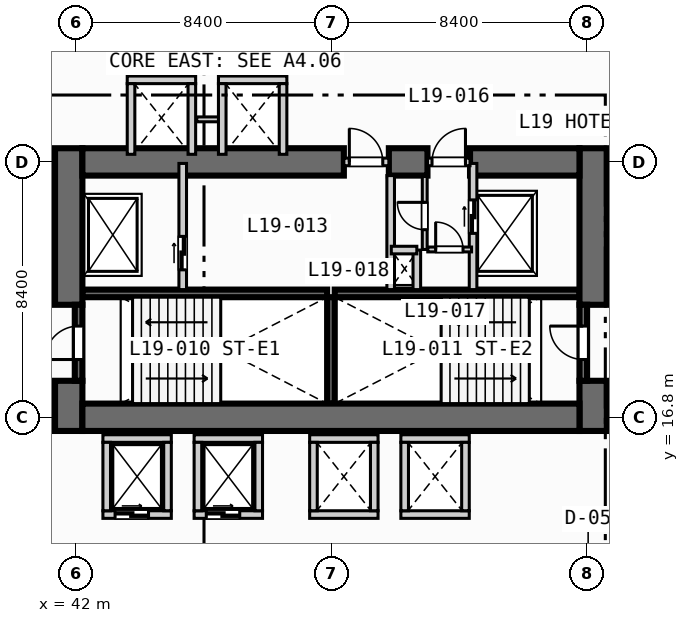
"""IFC4 building model, lengths in metres.
Left out: names, types, materials, properties, quantities, classifications, styles, units other than length and angle.
Written with IfcOpenShell. Run it as: python <this file> out.ifc"""

import sys

from ifc_helpers import new_model, si_unit, direction, frame, frame_2d, origin, place, context, subcontext, project, spatial, rectangle, extrude, element, fill, save


model = new_model("IFC4")
c1 = context("Model", 3, precision=1e-05, world=origin(), true_north=direction((0.0, 1.0)))
c2 = subcontext(c1, "Body", "Model", "MODEL_VIEW")
j1 = project(units=[si_unit("LENGTHUNIT", "METRE"), si_unit("PLANEANGLEUNIT", "RADIAN")], contexts=[c1])
p1 = place(None, origin())
s1 = spatial("IfcSite", under=j1, at=p1, CompositionType="ELEMENT")
p2 = place(p1, origin())
s2 = spatial("IfcBuilding", under=s1, at=p2, CompositionType="ELEMENT")
p3 = place(p2, frame((0.0, 0.0, 81.4)))
s3 = spatial("IfcBuildingStorey", under=s2, at=p3, CompositionType="ELEMENT", Elevation=81.4)
for number, where, z_axis, x_axis in (
    (1, (42.2, 20.875, 0.0), (0.0, 0.0, 1.0), (1.0, 0.0, 0.0)),
    (2, (50.5, 20.875, 0.0), (0.0, 0.0, 1.0), (1.0, 0.0, 0.0)),
):
    element("IfcWall", number, at=place(p3, frame(where, z_axis=z_axis, x_axis=x_axis)), inside=s3, PredefinedType="SOLIDWALL", context=c2, shape_type="SweptSolid", body=[
        extrude(rectangle(XDim=8.05, YDim=0.25, at=frame_2d((4.025, 0.0))), origin(), (0.0, 0.0, 1.0), 3.55),
    ])
p4 = place(p3, frame((50.375, 17.25, 0.0), z_axis=(0.0, 0.0, 1.0), x_axis=(0.0, 1.0, 0.0)))
e3 = element("IfcWall", 3, at=p4, inside=s3, PredefinedType="SOLIDWALL", context=c2, shape_type="SweptSolid", body=[
    extrude(rectangle(XDim=3.5, YDim=0.25, at=frame_2d((1.75, 0.0))), origin(), (0.0, 0.0, 1.0), 3.55),
])
p5 = place(p3, frame((41.75, 16.35, 0.0), z_axis=(0.0, 0.0, 1.0), x_axis=(0.0, 1.0, 0.0)))
e4 = element("IfcWall", 4, at=p5, inside=s3, PredefinedType="SHEAR", context=c2, shape_type="SweptSolid", body=[
    extrude(rectangle(XDim=1.65, YDim=0.9, at=frame_2d((0.825, 0.0))), origin(), (0.0, 0.0, 1.0), 3.55),
])
p6 = place(p3, frame((41.75, 20.5, 0.0), z_axis=(0.0, 0.0, 1.0), x_axis=(0.0, 1.0, 0.0)))
e5 = element("IfcWall", 5, at=p6, inside=s3, PredefinedType="SHEAR", context=c2, shape_type="SweptSolid", body=[
    extrude(rectangle(XDim=5.15, YDim=0.9, at=frame_2d((2.575, 0.0))), origin(), (0.0, 0.0, 1.0), 3.55),
])
p7 = place(p3, frame((59.0, 16.35, 0.0), z_axis=(0.0, 0.0, 1.0), x_axis=(0.0, 1.0, 0.0)))
e6 = element("IfcWall", 6, at=p7, inside=s3, PredefinedType="SHEAR", context=c2, shape_type="SweptSolid", body=[
    extrude(rectangle(XDim=1.65, YDim=0.9, at=frame_2d((0.825, 0.0))), origin(), (0.0, 0.0, 1.0), 3.55),
])
p8 = place(p3, frame((59.0, 20.5, 0.0), z_axis=(0.0, 0.0, 1.0), x_axis=(0.0, 1.0, 0.0)))
e7 = element("IfcWall", 7, at=p8, inside=s3, PredefinedType="SHEAR", context=c2, shape_type="SweptSolid", body=[
    extrude(rectangle(XDim=5.15, YDim=0.9, at=frame_2d((2.575, 0.0))), origin(), (0.0, 0.0, 1.0), 3.55),
])
p9 = place(p3, frame((42.2, 16.8, 0.0), z_axis=(0.0, 0.0, 1.0), x_axis=(1.0, 0.0, 0.0)))
e8 = element("IfcWall", 8, at=p9, inside=s3, PredefinedType="SHEAR", context=c2, shape_type="SweptSolid", body=[
    extrude(rectangle(XDim=16.35, YDim=0.9, at=frame_2d((8.175, 0.0))), origin(), (0.0, 0.0, 1.0), 3.55),
])
p10 = place(p3, frame((42.2, 25.2, 0.0), z_axis=(0.0, 0.0, 1.0), x_axis=(1.0, 0.0, 0.0)))
e9 = element("IfcWall", 9, at=p10, inside=s3, PredefinedType="SHEAR", context=c2, shape_type="SweptSolid", body=[
    extrude(rectangle(XDim=8.6, YDim=0.9, at=frame_2d((4.3, 0.0))), origin(), (0.0, 0.0, 1.0), 3.55),
])
p11 = place(p3, frame((52.28, 25.2, 0.0), z_axis=(0.0, 0.0, 1.0), x_axis=(1.0, 0.0, 0.0)))
e10 = element("IfcWall", 10, at=p11, inside=s3, PredefinedType="SHEAR", context=c2, shape_type="SweptSolid", body=[
    extrude(rectangle(XDim=1.27, YDim=0.9, at=frame_2d((0.635, 0.0))), origin(), (0.0, 0.0, 1.0), 3.55),
])
p12 = place(p3, frame((54.95, 25.2, 0.0), z_axis=(0.0, 0.0, 1.0), x_axis=(1.0, 0.0, 0.0)))
e11 = element("IfcWall", 11, at=p12, inside=s3, PredefinedType="SHEAR", context=c2, shape_type="SweptSolid", body=[
    extrude(rectangle(XDim=3.6, YDim=0.9, at=frame_2d((1.8, 0.0))), origin(), (0.0, 0.0, 1.0), 3.55),
])
p13 = place(p3, frame((42.075, 18.0, 0.0), z_axis=(0.0, 0.0, 1.0), x_axis=(0.0, 1.0, 0.0)))
e12 = element("IfcWall", 12, at=p13, inside=s3, PredefinedType="SOLIDWALL", context=c2, shape_type="SweptSolid", body=[
    extrude(rectangle(XDim=2.5, YDim=0.25, at=frame_2d((1.25, 0.0))), origin(), (0.0, 0.0, 1.0), 3.55),
])
p14 = place(p13, frame((0.7, 0.0, 0.0)))
e13 = element("IfcOpeningElement", 13, at=p14, cuts=e12, PredefinedType="OPENING", context=c2, shape_type="SweptSolid", body=[
    extrude(rectangle(XDim=1.1, YDim=2.15, at=frame_2d((0.55, 1.075))), frame((0.0, 0.135, 0.0), z_axis=(0.0, -1.0, 0.0), x_axis=(1.0, 0.0, 0.0)), (0.0, 0.0, 1.0), 0.27),
])
p15 = place(p3, frame((58.675, 18.0, 0.0), z_axis=(0.0, 0.0, 1.0), x_axis=(0.0, 1.0, 0.0)))
e14 = element("IfcWall", 14, at=p15, inside=s3, PredefinedType="SOLIDWALL", context=c2, shape_type="SweptSolid", body=[
    extrude(rectangle(XDim=2.5, YDim=0.25, at=frame_2d((1.25, 0.0))), origin(), (0.0, 0.0, 1.0), 3.55),
])
p16 = place(p15, frame((0.7, 0.0, 0.0)))
e15 = element("IfcOpeningElement", 15, at=p16, cuts=e14, PredefinedType="OPENING", context=c2, shape_type="SweptSolid", body=[
    extrude(rectangle(XDim=1.1, YDim=2.15, at=frame_2d((0.55, 1.075))), frame((0.0, 0.135, 0.0), z_axis=(0.0, -1.0, 0.0), x_axis=(1.0, 0.0, 0.0)), (0.0, 0.0, 1.0), 0.27),
])
p17 = place(p3, frame((45.5, 21.0, 0.0), z_axis=(0.0, 0.0, 1.0), x_axis=(0.0, 1.0, 0.0)))
e16 = element("IfcWall", 16, at=p17, inside=s3, PredefinedType="SOLIDWALL", context=c2, shape_type="SweptSolid", body=[
    extrude(rectangle(XDim=4.15, YDim=0.25, at=frame_2d((2.075, 0.0))), origin(), (0.0, 0.0, 1.0), 3.55),
])
p18 = place(p17, frame((0.65, 0.0, 0.0)))
e17 = element("IfcOpeningElement", 17, at=p18, cuts=e16, PredefinedType="OPENING", context=c2, shape_type="SweptSolid", body=[
    extrude(rectangle(XDim=1.1, YDim=2.15, at=frame_2d((0.55, 1.075))), frame((0.0, 0.135, 0.0), z_axis=(0.0, -1.0, 0.0), x_axis=(1.0, 0.0, 0.0)), (0.0, 0.0, 1.0), 0.27),
])
p19 = place(p3, frame((50.8, 25.2, 0.0), z_axis=(0.0, 0.0, 1.0), x_axis=(1.0, 0.0, 0.0)))
e18 = element("IfcWall", 18, at=p19, inside=s3, PredefinedType="SOLIDWALL", context=c2, shape_type="SweptSolid", body=[
    extrude(rectangle(XDim=1.48, YDim=0.25, at=frame_2d((0.74, 0.0))), origin(), (0.0, 0.0, 1.0), 3.55),
])
p20 = place(p19, frame((0.18, 0.0, 0.0)))
e19 = element("IfcOpeningElement", 19, at=p20, cuts=e18, PredefinedType="OPENING", context=c2, shape_type="SweptSolid", body=[
    extrude(rectangle(XDim=1.1, YDim=2.15, at=frame_2d((0.55, 1.075))), frame((0.0, 0.135, 0.0), z_axis=(0.0, -1.0, 0.0), x_axis=(1.0, 0.0, 0.0)), (0.0, 0.0, 1.0), 0.27),
])
p21 = place(p3, frame((52.34, 21.0, 0.0), z_axis=(0.0, 0.0, 1.0), x_axis=(0.0, 1.0, 0.0)))
e20 = element("IfcWall", 20, at=p21, inside=s3, PredefinedType="SOLIDWALL", context=c2, shape_type="SweptSolid", body=[
    extrude(rectangle(XDim=3.75, YDim=0.25, at=frame_2d((1.875, 0.0))), origin(), (0.0, 0.0, 1.0), 3.55),
])
p22 = place(p3, frame((55.05, 21.0, 0.0), z_axis=(0.0, 0.0, 1.0), x_axis=(0.0, 1.0, 0.0)))
e21 = element("IfcWall", 21, at=p22, inside=s3, PredefinedType="SOLIDWALL", context=c2, shape_type="SweptSolid", body=[
    extrude(rectangle(XDim=4.15, YDim=0.25, at=frame_2d((2.075, 0.0))), origin(), (0.0, 0.0, 1.0), 3.55),
])
p23 = place(p22, frame((1.85, 0.0, 0.0)))
e22 = element("IfcOpeningElement", 22, at=p23, cuts=e21, PredefinedType="OPENING", context=c2, shape_type="SweptSolid", body=[
    extrude(rectangle(XDim=1.1, YDim=2.15, at=frame_2d((0.55, 1.075))), frame((0.0, 0.135, 0.0), z_axis=(0.0, -1.0, 0.0), x_axis=(1.0, 0.0, 0.0)), (0.0, 0.0, 1.0), 0.27),
])
p24 = place(p3, frame((53.55, 25.2, 0.0), z_axis=(0.0, 0.0, 1.0), x_axis=(1.0, 0.0, 0.0)))
e23 = element("IfcWall", 23, at=p24, inside=s3, PredefinedType="SOLIDWALL", context=c2, shape_type="SweptSolid", body=[
    extrude(rectangle(XDim=1.4, YDim=0.25, at=frame_2d((0.7, 0.0))), origin(), (0.0, 0.0, 1.0), 3.55),
])
p25 = place(p24, frame((0.15, 0.0, 0.0)))
e24 = element("IfcOpeningElement", 24, at=p25, cuts=e23, PredefinedType="OPENING", context=c2, shape_type="SweptSolid", body=[
    extrude(rectangle(XDim=1.1, YDim=2.15, at=frame_2d((0.55, 1.075))), frame((0.0, 0.135, 0.0), z_axis=(0.0, -1.0, 0.0), x_axis=(1.0, 0.0, 0.0)), (0.0, 0.0, 1.0), 0.27),
])
p26 = place(p3, frame((53.2, 21.0, 0.0), z_axis=(0.0, 0.0, 1.0), x_axis=(0.0, 1.0, 0.0)))
e25 = element("IfcWall", 25, at=p26, inside=s3, PredefinedType="SOLIDWALL", context=c2, shape_type="SweptSolid", body=[
    extrude(rectangle(XDim=1.3, YDim=0.25, at=frame_2d((0.65, 0.0))), origin(), (0.0, 0.0, 1.0), 3.55),
])
p27 = place(p3, frame((52.36, 22.3, 0.0), z_axis=(0.0, 0.0, 1.0), x_axis=(1.0, 0.0, 0.0)))
e26 = element("IfcWall", 26, at=p27, inside=s3, PredefinedType="SOLIDWALL", context=c2, shape_type="SweptSolid", body=[
    extrude(rectangle(XDim=0.84, YDim=0.25, at=frame_2d((0.42, 0.0))), origin(), (0.0, 0.0, 1.0), 3.55),
])
p28 = place(p3, frame((53.56, 22.32, 0.0), z_axis=(0.0, 0.0, 1.0), x_axis=(1.0, 0.0, 0.0)))
e27 = element("IfcWall", 27, at=p28, inside=s3, PredefinedType="PARTITIONING", context=c2, shape_type="SweptSolid", body=[
    extrude(rectangle(XDim=1.44, YDim=0.16, at=frame_2d((0.72, 0.0))), origin(), (0.0, 0.0, 1.0), 3.55),
])
p29 = place(p28, frame((0.26, 0.0, 0.0)))
e28 = element("IfcOpeningElement", 28, at=p29, cuts=e27, PredefinedType="OPENING", context=c2, shape_type="SweptSolid", body=[
    extrude(rectangle(XDim=0.9, YDim=2.1, at=frame_2d((0.45, 1.05))), frame((0.0, 0.09, 0.0), z_axis=(0.0, -1.0, 0.0), x_axis=(1.0, 0.0, 0.0)), (0.0, 0.0, 1.0), 0.18),
])
p30 = place(p3, frame((53.46, 22.32, 0.0), z_axis=(0.0, 0.0, 1.0), x_axis=(0.0, 1.0, 0.0)))
e29 = element("IfcWall", 29, at=p30, inside=s3, PredefinedType="PARTITIONING", context=c2, shape_type="SweptSolid", body=[
    extrude(rectangle(XDim=2.4, YDim=0.16, at=frame_2d((1.2, 0.0))), origin(), (0.0, 0.0, 1.0), 3.55),
])
p31 = place(p30, frame((0.65, 0.0, 0.0)))
e30 = element("IfcOpeningElement", 30, at=p31, cuts=e29, PredefinedType="OPENING", context=c2, shape_type="SweptSolid", body=[
    extrude(rectangle(XDim=0.9, YDim=2.1, at=frame_2d((0.45, 1.05))), frame((0.0, 0.09, 0.0), z_axis=(0.0, -1.0, 0.0), x_axis=(1.0, 0.0, 0.0)), (0.0, 0.0, 1.0), 0.18),
])
p32 = place(p3, frame((42.875, 13.6, 0.0), z_axis=(0.0, 0.0, 1.0), x_axis=(1.0, 0.0, 0.0)))
e31 = element("IfcWall", 31, at=p32, inside=s3, PredefinedType="SOLIDWALL", context=c2, shape_type="SweptSolid", body=[
    extrude(rectangle(XDim=2.25, YDim=0.25, at=frame_2d((1.125, 0.0))), origin(), (0.0, 0.0, 1.0), 3.55),
])
p33 = place(p32, frame((0.4, 0.0, 0.0)))
e32 = element("IfcOpeningElement", 32, at=p33, cuts=e31, PredefinedType="OPENING", context=c2, shape_type="SweptSolid", body=[
    extrude(rectangle(XDim=1.1, YDim=2.15, at=frame_2d((0.55, 1.075))), frame((0.0, 0.135, 0.0), z_axis=(0.0, -1.0, 0.0), x_axis=(1.0, 0.0, 0.0)), (0.0, 0.0, 1.0), 0.27),
])
for number, where, z_axis, x_axis in (
    (33, (42.875, 16.1, 0.0), (0.0, 0.0, 1.0), (1.0, 0.0, 0.0)),
    (34, (43.0, 13.725, 0.0), (0.0, 0.0, 1.0), (0.0, 1.0, 0.0)),
    (35, (45.0, 13.725, 0.0), (0.0, 0.0, 1.0), (0.0, 1.0, 0.0)),
):
    element("IfcWall", number, at=place(p3, frame(where, z_axis=z_axis, x_axis=x_axis)), inside=s3, PredefinedType="SOLIDWALL", context=c2, shape_type="SweptSolid", body=[
        extrude(rectangle(XDim=2.25, YDim=0.25, at=frame_2d((1.125, 0.0))), origin(), (0.0, 0.0, 1.0), 3.55),
    ])
p34 = place(p3, frame((45.875, 13.6, 0.0), z_axis=(0.0, 0.0, 1.0), x_axis=(1.0, 0.0, 0.0)))
e36 = element("IfcWall", 36, at=p34, inside=s3, PredefinedType="SOLIDWALL", context=c2, shape_type="SweptSolid", body=[
    extrude(rectangle(XDim=2.25, YDim=0.25, at=frame_2d((1.125, 0.0))), origin(), (0.0, 0.0, 1.0), 3.55),
])
p35 = place(p34, frame((0.4, 0.0, 0.0)))
e37 = element("IfcOpeningElement", 37, at=p35, cuts=e36, PredefinedType="OPENING", context=c2, shape_type="SweptSolid", body=[
    extrude(rectangle(XDim=1.1, YDim=2.15, at=frame_2d((0.55, 1.075))), frame((0.0, 0.135, 0.0), z_axis=(0.0, -1.0, 0.0), x_axis=(1.0, 0.0, 0.0)), (0.0, 0.0, 1.0), 0.27),
])
for number, where, z_axis, x_axis in (
    (38, (45.875, 16.1, 0.0), (0.0, 0.0, 1.0), (1.0, 0.0, 0.0)),
    (39, (46.0, 13.725, 0.0), (0.0, 0.0, 1.0), (0.0, 1.0, 0.0)),
    (40, (48.0, 13.725, 0.0), (0.0, 0.0, 1.0), (0.0, 1.0, 0.0)),
    (41, (49.675, 13.6, 0.0), (0.0, 0.0, 1.0), (1.0, 0.0, 0.0)),
    (42, (49.675, 16.1, 0.0), (0.0, 0.0, 1.0), (1.0, 0.0, 0.0)),
    (43, (49.8, 13.725, 0.0), (0.0, 0.0, 1.0), (0.0, 1.0, 0.0)),
    (44, (51.8, 13.725, 0.0), (0.0, 0.0, 1.0), (0.0, 1.0, 0.0)),
    (45, (52.675, 13.6, 0.0), (0.0, 0.0, 1.0), (1.0, 0.0, 0.0)),
    (46, (52.675, 16.1, 0.0), (0.0, 0.0, 1.0), (1.0, 0.0, 0.0)),
    (47, (52.8, 13.725, 0.0), (0.0, 0.0, 1.0), (0.0, 1.0, 0.0)),
    (48, (54.8, 13.725, 0.0), (0.0, 0.0, 1.0), (0.0, 1.0, 0.0)),
    (49, (43.675, 27.9, 0.0), (0.0, 0.0, 1.0), (1.0, 0.0, 0.0)),
):
    element("IfcWall", number, at=place(p3, frame(where, z_axis=z_axis, x_axis=x_axis)), inside=s3, PredefinedType="SOLIDWALL", context=c2, shape_type="SweptSolid", body=[
        extrude(rectangle(XDim=2.25, YDim=0.25, at=frame_2d((1.125, 0.0))), origin(), (0.0, 0.0, 1.0), 3.55),
    ])
for number, where, z_axis, x_axis in (
    (50, (43.8, 25.45, 0.0), (0.0, 0.0, 1.0), (0.0, 1.0, 0.0)),
    (51, (45.8, 25.45, 0.0), (0.0, 0.0, 1.0), (0.0, 1.0, 0.0)),
):
    element("IfcWall", number, at=place(p3, frame(where, z_axis=z_axis, x_axis=x_axis)), inside=s3, PredefinedType="SOLIDWALL", context=c2, shape_type="SweptSolid", body=[
        extrude(rectangle(XDim=2.325, YDim=0.25, at=frame_2d((1.163, 0.0))), origin(), (0.0, 0.0, 1.0), 3.55),
    ])
p36 = place(p3, frame((45.96, 26.6, 0.0), z_axis=(0.0, 0.0, 1.0), x_axis=(1.0, 0.0, 0.0)))
e52 = element("IfcWall", 52, at=p36, inside=s3, PredefinedType="PARTITIONING", context=c2, shape_type="SweptSolid", body=[
    extrude(rectangle(XDim=0.88, YDim=0.16, at=frame_2d((0.44, 0.0))), origin(), (0.0, 0.0, 1.0), 3.55),
])
p37 = place(p3, frame((46.675, 27.9, 0.0), z_axis=(0.0, 0.0, 1.0), x_axis=(1.0, 0.0, 0.0)))
e53 = element("IfcWall", 53, at=p37, inside=s3, PredefinedType="SOLIDWALL", context=c2, shape_type="SweptSolid", body=[
    extrude(rectangle(XDim=2.25, YDim=0.25, at=frame_2d((1.125, 0.0))), origin(), (0.0, 0.0, 1.0), 3.55),
])
for number, where, z_axis, x_axis in (
    (54, (46.8, 25.45, 0.0), (0.0, 0.0, 1.0), (0.0, 1.0, 0.0)),
    (55, (48.8, 25.45, 0.0), (0.0, 0.0, 1.0), (0.0, 1.0, 0.0)),
):
    element("IfcWall", number, at=place(p3, frame(where, z_axis=z_axis, x_axis=x_axis)), inside=s3, PredefinedType="SOLIDWALL", context=c2, shape_type="SweptSolid", body=[
        extrude(rectangle(XDim=2.325, YDim=0.25, at=frame_2d((1.163, 0.0))), origin(), (0.0, 0.0, 1.0), 3.55),
    ])
p38 = place(p14, origin())
e56 = element("IfcDoor", 56, at=p38, inside=s3, OperationType="SINGLE_SWING_LEFT", PredefinedType="DOOR", context=c2, shape_type="SweptSolid", body=[
    extrude(rectangle(XDim=1.1, YDim=2.15, at=frame_2d((0.55, 1.075))), frame((0.0, 0.025, 0.0), z_axis=(0.0, -1.0, 0.0), x_axis=(1.0, 0.0, 0.0)), (0.0, 0.0, 1.0), 0.05),
])
fill(e13, e56)
p39 = place(p16, origin())
e57 = element("IfcDoor", 57, at=p39, inside=s3, OperationType="SINGLE_SWING_RIGHT", PredefinedType="DOOR", context=c2, shape_type="SweptSolid", body=[
    extrude(rectangle(XDim=1.1, YDim=2.15, at=frame_2d((0.55, 1.075))), frame((0.0, 0.025, 0.0), z_axis=(0.0, -1.0, 0.0), x_axis=(1.0, 0.0, 0.0)), (0.0, 0.0, 1.0), 0.05),
])
fill(e15, e57)
p40 = place(p18, origin())
e58 = element("IfcDoor", 58, at=p40, inside=s3, OperationType="SLIDING_TO_LEFT", PredefinedType="DOOR", context=c2, shape_type="SweptSolid", body=[
    extrude(rectangle(XDim=1.1, YDim=2.15, at=frame_2d((0.55, 1.075))), frame((0.0, 0.025, 0.0), z_axis=(0.0, -1.0, 0.0), x_axis=(1.0, 0.0, 0.0)), (0.0, 0.0, 1.0), 0.05),
])
fill(e17, e58)
p41 = place(p20, origin())
e59 = element("IfcDoor", 59, at=p41, inside=s3, OperationType="SINGLE_SWING_LEFT", PredefinedType="DOOR", context=c2, shape_type="SweptSolid", body=[
    extrude(rectangle(XDim=1.1, YDim=2.15, at=frame_2d((0.55, 1.075))), frame((0.0, 0.025, 0.0), z_axis=(0.0, -1.0, 0.0), x_axis=(1.0, 0.0, 0.0)), (0.0, 0.0, 1.0), 0.05),
])
fill(e19, e59)
p42 = place(p23, origin())
e60 = element("IfcDoor", 60, at=p42, inside=s3, OperationType="SLIDING_TO_LEFT", PredefinedType="DOOR", context=c2, shape_type="SweptSolid", body=[
    extrude(rectangle(XDim=1.1, YDim=2.15, at=frame_2d((0.55, 1.075))), frame((0.0, 0.025, 0.0), z_axis=(0.0, -1.0, 0.0), x_axis=(1.0, 0.0, 0.0)), (0.0, 0.0, 1.0), 0.05),
])
fill(e22, e60)
p43 = place(p25, origin())
e61 = element("IfcDoor", 61, at=p43, inside=s3, OperationType="SINGLE_SWING_RIGHT", PredefinedType="DOOR", context=c2, shape_type="SweptSolid", body=[
    extrude(rectangle(XDim=1.1, YDim=2.15, at=frame_2d((0.55, 1.075))), frame((0.0, 0.025, 0.0), z_axis=(0.0, -1.0, 0.0), x_axis=(1.0, 0.0, 0.0)), (0.0, 0.0, 1.0), 0.05),
])
fill(e24, e61)
p44 = place(p29, origin())
e62 = element("IfcDoor", 62, at=p44, inside=s3, OperationType="SINGLE_SWING_LEFT", PredefinedType="DOOR", context=c2, shape_type="SweptSolid", body=[
    extrude(rectangle(XDim=0.9, YDim=2.1, at=frame_2d((0.45, 1.05))), frame((0.0, 0.025, 0.0), z_axis=(0.0, -1.0, 0.0), x_axis=(1.0, 0.0, 0.0)), (0.0, 0.0, 1.0), 0.05),
])
fill(e28, e62)
p45 = place(p31, origin())
e63 = element("IfcDoor", 63, at=p45, inside=s3, OperationType="SINGLE_SWING_RIGHT", PredefinedType="DOOR", context=c2, shape_type="SweptSolid", body=[
    extrude(rectangle(XDim=0.9, YDim=2.1, at=frame_2d((0.45, 1.05))), frame((0.0, 0.025, 0.0), z_axis=(0.0, -1.0, 0.0), x_axis=(1.0, 0.0, 0.0)), (0.0, 0.0, 1.0), 0.05),
])
fill(e30, e63)
p46 = place(p33, origin())
e64 = element("IfcDoor", 64, at=p46, inside=s3, OperationType="SLIDING_TO_LEFT", PredefinedType="DOOR", context=c2, shape_type="SweptSolid", body=[
    extrude(rectangle(XDim=1.1, YDim=2.15, at=frame_2d((0.55, 1.075))), frame((0.0, 0.025, 0.0), z_axis=(0.0, -1.0, 0.0), x_axis=(1.0, 0.0, 0.0)), (0.0, 0.0, 1.0), 0.05),
])
fill(e32, e64)
p47 = place(p35, origin())
e65 = element("IfcDoor", 65, at=p47, inside=s3, OperationType="SLIDING_TO_LEFT", PredefinedType="DOOR", context=c2, shape_type="SweptSolid", body=[
    extrude(rectangle(XDim=1.1, YDim=2.15, at=frame_2d((0.55, 1.075))), frame((0.0, 0.025, 0.0), z_axis=(0.0, -1.0, 0.0), x_axis=(1.0, 0.0, 0.0)), (0.0, 0.0, 1.0), 0.05),
])
fill(e37, e65)
save(model, sys.argv[1])
